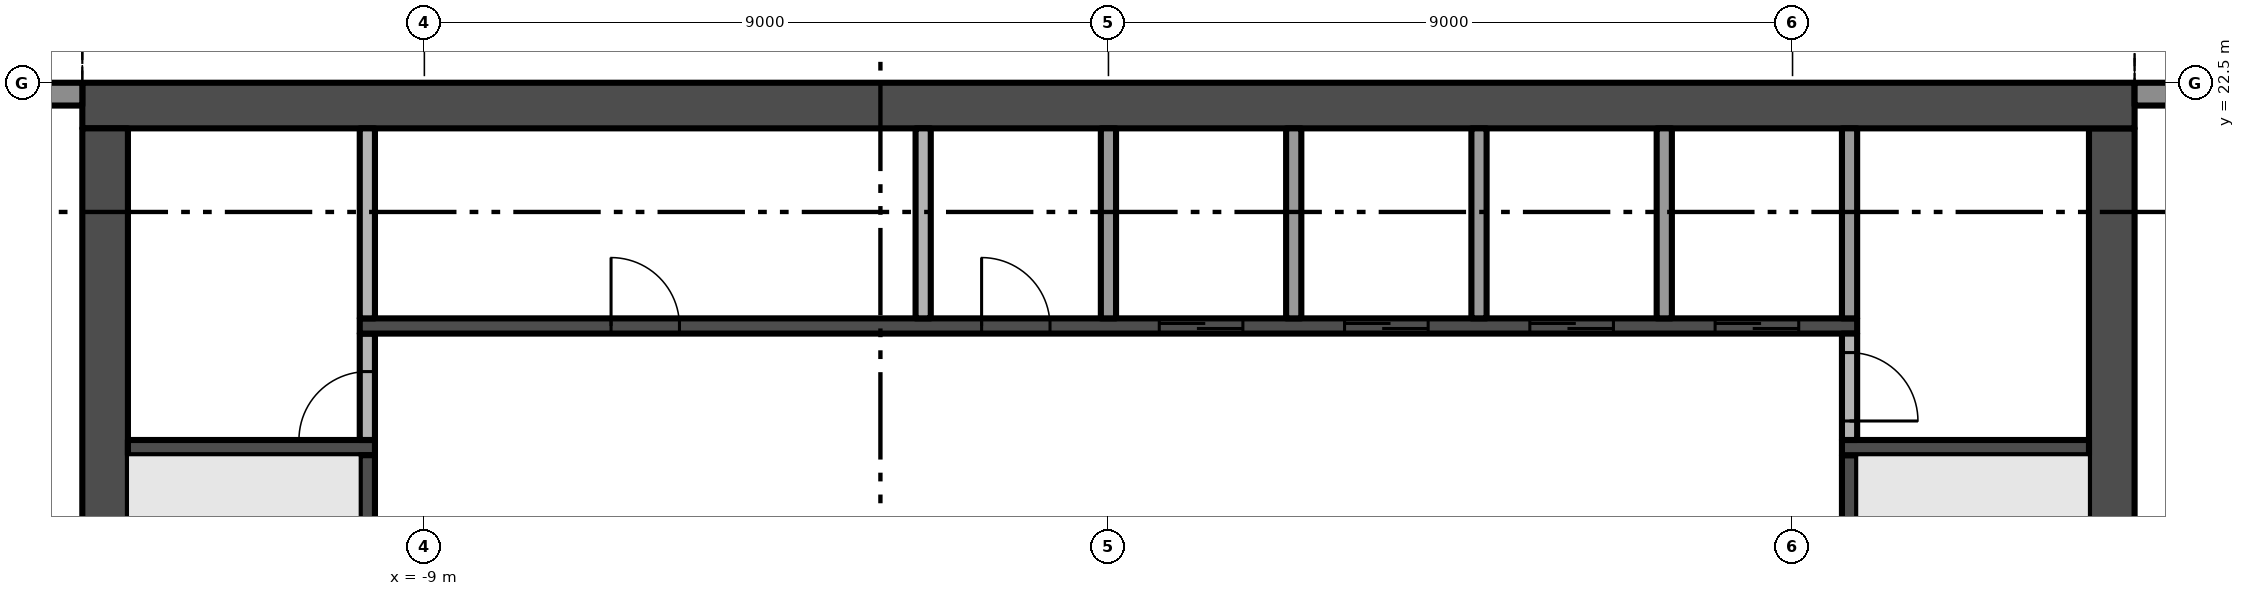
"""IFC4 building model, lengths in metres.
Left out: names, types, materials, properties, quantities, classifications, styles, units other than length and angle.
Written with IfcOpenShell. Run it as: python <this file> out.ifc"""

import sys

from ifc_helpers import new_model, si_unit, direction, frame, frame_2d, origin, place, context, subcontext, project, spatial, rectangle, extrude, element, fill, save


model = new_model("IFC4")
c1 = context("Model", 3, precision=1e-05, world=origin(), true_north=direction((0.0, 1.0)))
c2 = subcontext(c1, "Body", "Model", "MODEL_VIEW")
j1 = project(units=[si_unit("LENGTHUNIT", "METRE"), si_unit("PLANEANGLEUNIT", "RADIAN")], contexts=[c1])
p1 = place(None, origin())
s1 = spatial("IfcSite", under=j1, at=p1, CompositionType="ELEMENT")
p2 = place(p1, origin())
s2 = spatial("IfcBuilding", under=s1, at=p2, CompositionType="ELEMENT")
p3 = place(p2, frame((0.0, 0.0, 238.8)))
s3 = spatial("IfcBuildingStorey", under=s2, at=p3, CompositionType="ELEMENT", Elevation=238.8)
p4 = place(p3, frame((13.2, 5.1, -0.3), z_axis=(0.0, 0.0, 1.0), x_axis=(0.0, 1.0, 0.0)))
e1 = element("IfcWall", 1, at=p4, inside=s3, PredefinedType="SHEAR", context=c2, shape_type="SweptSolid", body=[
    extrude(rectangle(XDim=16.8, YDim=0.6, at=frame_2d((8.4, 0.0))), origin(), (0.0, 0.0, 1.0), 3.8),
])
p5 = place(p4, frame((6.3, 0.0, 0.3)))
e2 = element("IfcOpeningElement", 2, at=p5, cuts=e1, PredefinedType="OPENING", context=c2, shape_type="SweptSolid", body=[
    extrude(rectangle(XDim=1.2, YDim=2.2, at=frame_2d((0.6, 1.1))), frame((0.0, 0.31, 0.0), z_axis=(0.0, -1.0, 0.0), x_axis=(1.0, 0.0, 0.0)), (0.0, 0.0, 1.0), 0.62),
])
p6 = place(p3, frame((13.5, 22.2, -0.3), z_axis=(0.0, 0.0, 1.0), x_axis=(-1.0, 0.0, 0.0)))
e3 = element("IfcWall", 3, at=p6, inside=s3, PredefinedType="SHEAR", context=c2, shape_type="SweptSolid", body=[
    extrude(rectangle(XDim=27.0, YDim=0.6, at=frame_2d((13.5, 0.0))), origin(), (0.0, 0.0, 1.0), 3.8),
])
p7 = place(p3, frame((-13.2, 21.9, -0.3), z_axis=(0.0, 0.0, 1.0), x_axis=(0.0, -1.0, 0.0)))
e4 = element("IfcWall", 4, at=p7, inside=s3, PredefinedType="SHEAR", context=c2, shape_type="SweptSolid", body=[
    extrude(rectangle(XDim=16.8, YDim=0.6, at=frame_2d((8.4, 0.0))), origin(), (0.0, 0.0, 1.0), 3.8),
])
p8 = place(p7, frame((9.3, 0.0, 0.3)))
e5 = element("IfcOpeningElement", 5, at=p8, cuts=e4, PredefinedType="OPENING", context=c2, shape_type="SweptSolid", body=[
    extrude(rectangle(XDim=1.2, YDim=2.2, at=frame_2d((0.6, 1.1))), frame((0.0, 0.31, 0.0), z_axis=(0.0, -1.0, 0.0), x_axis=(1.0, 0.0, 0.0)), (0.0, 0.0, 1.0), 0.62),
])
p9 = place(p3, frame((13.5, 22.35, 0.0), z_axis=(0.0, 0.0, 1.0), x_axis=(1.0, 0.0, 0.0)))
e6 = element("IfcWall", 6, at=p9, inside=s3, PredefinedType="SOLIDWALL", context=c2, shape_type="SweptSolid", body=[
    extrude(rectangle(XDim=4.05, YDim=0.3, at=frame_2d((2.025, 0.0))), origin(), (0.0, 0.0, 1.0), 3.5),
])
p10 = place(p9, frame((0.55, 0.0, 0.0)))
e7 = element("IfcOpeningElement", 7, at=p10, cuts=e6, PredefinedType="OPENING", context=c2, shape_type="SweptSolid", body=[
    extrude(rectangle(XDim=3.2, YDim=2.4, at=frame_2d((1.6, 1.2))), frame((0.0, 0.16, 0.0), z_axis=(0.0, -1.0, 0.0), x_axis=(1.0, 0.0, 0.0)), (0.0, 0.0, 1.0), 0.32),
])
p11 = place(p3, frame((-17.55, 22.35, 0.0), z_axis=(0.0, 0.0, 1.0), x_axis=(1.0, 0.0, 0.0)))
e8 = element("IfcWall", 8, at=p11, inside=s3, PredefinedType="SOLIDWALL", context=c2, shape_type="SweptSolid", body=[
    extrude(rectangle(XDim=4.05, YDim=0.3, at=frame_2d((2.025, 0.0))), origin(), (0.0, 0.0, 1.0), 3.5),
])
p12 = place(p11, frame((0.3, 0.0, 0.45)))
e9 = element("IfcOpeningElement", 9, at=p12, cuts=e8, PredefinedType="OPENING", context=c2, shape_type="SweptSolid", body=[
    extrude(rectangle(XDim=3.2, YDim=2.65, at=frame_2d((1.6, 1.325))), frame((0.0, 0.16, 0.0), z_axis=(0.0, -1.0, 0.0), x_axis=(1.0, 0.0, 0.0)), (0.0, 0.0, 1.0), 0.32),
])
p13 = place(p3, frame((-12.9, 17.7, 0.0), z_axis=(0.0, 0.0, 1.0), x_axis=(1.0, 0.0, 0.0)))
e10 = element("IfcWall", 10, at=p13, inside=s3, PredefinedType="SHEAR", context=c2, shape_type="SweptSolid", body=[
    extrude(rectangle(XDim=3.25, YDim=0.2, at=frame_2d((1.625, 0.0))), origin(), (0.0, 0.0, 1.0), 3.5),
])
p14 = place(p3, frame((-9.75, 16.1, 0.0), z_axis=(0.0, 0.0, 1.0), x_axis=(0.0, 1.0, 0.0)))
e11 = element("IfcWall", 11, at=p14, inside=s3, PredefinedType="SHEAR", context=c2, shape_type="SweptSolid", body=[
    extrude(rectangle(XDim=1.5, YDim=0.2, at=frame_2d((0.75, 0.0))), origin(), (0.0, 0.0, 1.0), 3.5),
])
p15 = place(p3, frame((-9.75, 17.8, 0.0), z_axis=(0.0, 0.0, 1.0), x_axis=(0.0, 1.0, 0.0)))
e12 = element("IfcWall", 12, at=p15, inside=s3, PredefinedType="PARTITIONING", context=c2, shape_type="SweptSolid", body=[
    extrude(rectangle(XDim=1.4, YDim=0.2, at=frame_2d((0.7, 0.0))), origin(), (0.0, 0.0, 1.0), 3.5),
])
p16 = place(p15, origin())
e13 = element("IfcOpeningElement", 13, at=p16, cuts=e12, PredefinedType="OPENING", context=c2, shape_type="SweptSolid", body=[
    extrude(rectangle(XDim=0.9, YDim=2.1, at=frame_2d((0.45, 1.05))), frame((0.0, 0.11, 0.0), z_axis=(0.0, -1.0, 0.0), x_axis=(1.0, 0.0, 0.0)), (0.0, 0.0, 1.0), 0.22),
])
p17 = place(p3, frame((-9.85, 19.3, 0.0), z_axis=(0.0, 0.0, 1.0), x_axis=(1.0, 0.0, 0.0)))
e14 = element("IfcWall", 14, at=p17, inside=s3, PredefinedType="SHEAR", context=c2, shape_type="SweptSolid", body=[
    extrude(rectangle(XDim=19.7, YDim=0.2, at=frame_2d((9.85, 0.0))), origin(), (0.0, 0.0, 1.0), 3.5),
])
p18 = place(p17, frame((10.519, 0.0, 0.0)))
e15 = element("IfcOpeningElement", 15, at=p18, cuts=e14, PredefinedType="OPENING", context=c2, shape_type="SweptSolid", body=[
    extrude(rectangle(XDim=1.1, YDim=2.1, at=frame_2d((0.55, 1.05))), frame((0.0, 0.11, 0.0), z_axis=(0.0, -1.0, 0.0), x_axis=(1.0, 0.0, 0.0)), (0.0, 0.0, 1.0), 0.22),
])
p19 = place(p17, frame((12.956, 0.0, 0.0)))
e16 = element("IfcOpeningElement", 16, at=p19, cuts=e14, PredefinedType="OPENING", context=c2, shape_type="SweptSolid", body=[
    extrude(rectangle(XDim=1.1, YDim=2.1, at=frame_2d((0.55, 1.05))), frame((0.0, 0.11, 0.0), z_axis=(0.0, -1.0, 0.0), x_axis=(1.0, 0.0, 0.0)), (0.0, 0.0, 1.0), 0.22),
])
p20 = place(p17, frame((15.394, 0.0, 0.0)))
e17 = element("IfcOpeningElement", 17, at=p20, cuts=e14, PredefinedType="OPENING", context=c2, shape_type="SweptSolid", body=[
    extrude(rectangle(XDim=1.1, YDim=2.1, at=frame_2d((0.55, 1.05))), frame((0.0, 0.11, 0.0), z_axis=(0.0, -1.0, 0.0), x_axis=(1.0, 0.0, 0.0)), (0.0, 0.0, 1.0), 0.22),
])
p21 = place(p17, frame((17.831, 0.0, 0.0)))
e18 = element("IfcOpeningElement", 18, at=p21, cuts=e14, PredefinedType="OPENING", context=c2, shape_type="SweptSolid", body=[
    extrude(rectangle(XDim=1.1, YDim=2.1, at=frame_2d((0.55, 1.05))), frame((0.0, 0.11, 0.0), z_axis=(0.0, -1.0, 0.0), x_axis=(1.0, 0.0, 0.0)), (0.0, 0.0, 1.0), 0.22),
])
p22 = place(p17, frame((3.306, 0.0, 0.0)))
e19 = element("IfcOpeningElement", 19, at=p22, cuts=e14, PredefinedType="OPENING", context=c2, shape_type="SweptSolid", body=[
    extrude(rectangle(XDim=0.9, YDim=2.1, at=frame_2d((0.45, 1.05))), frame((0.0, 0.11, 0.0), z_axis=(0.0, -1.0, 0.0), x_axis=(1.0, 0.0, 0.0)), (0.0, 0.0, 1.0), 0.22),
])
p23 = place(p17, frame((8.181, 0.0, 0.0)))
e20 = element("IfcOpeningElement", 20, at=p23, cuts=e14, PredefinedType="OPENING", context=c2, shape_type="SweptSolid", body=[
    extrude(rectangle(XDim=0.9, YDim=2.1, at=frame_2d((0.45, 1.05))), frame((0.0, 0.11, 0.0), z_axis=(0.0, -1.0, 0.0), x_axis=(1.0, 0.0, 0.0)), (0.0, 0.0, 1.0), 0.22),
])
for number, where, z_axis, x_axis in (
    (21, (-9.75, 19.4, 0.0), (0.0, 0.0, 1.0), (0.0, 1.0, 0.0)),
    (22, (-2.438, 19.4, 0.0), (0.0, 0.0, 1.0), (0.0, 1.0, 0.0)),
    (23, (0.0, 19.4, 0.0), (0.0, 0.0, 1.0), (0.0, 1.0, 0.0)),
    (24, (2.438, 19.4, 0.0), (0.0, 0.0, 1.0), (0.0, 1.0, 0.0)),
    (25, (4.875, 19.4, 0.0), (0.0, 0.0, 1.0), (0.0, 1.0, 0.0)),
    (26, (7.312, 19.4, 0.0), (0.0, 0.0, 1.0), (0.0, 1.0, 0.0)),
):
    element("IfcWall", number, at=place(p3, frame(where, z_axis=z_axis, x_axis=x_axis)), inside=s3, PredefinedType="PARTITIONING", context=c2, shape_type="SweptSolid", body=[
        extrude(rectangle(XDim=2.5, YDim=0.2, at=frame_2d((1.25, 0.0))), origin(), (0.0, 0.0, 1.0), 3.5),
    ])
p24 = place(p3, frame((9.75, 16.1, 0.0), z_axis=(0.0, 0.0, 1.0), x_axis=(0.0, 1.0, 0.0)))
e27 = element("IfcWall", 27, at=p24, inside=s3, PredefinedType="SHEAR", context=c2, shape_type="SweptSolid", body=[
    extrude(rectangle(XDim=1.5, YDim=0.2, at=frame_2d((0.75, 0.0))), origin(), (0.0, 0.0, 1.0), 3.5),
])
p25 = place(p3, frame((9.65, 17.7, 0.0), z_axis=(0.0, 0.0, 1.0), x_axis=(1.0, 0.0, 0.0)))
e28 = element("IfcWall", 28, at=p25, inside=s3, PredefinedType="SHEAR", context=c2, shape_type="SweptSolid", body=[
    extrude(rectangle(XDim=3.25, YDim=0.2, at=frame_2d((1.625, 0.0))), origin(), (0.0, 0.0, 1.0), 3.5),
])
p26 = place(p3, frame((9.75, 19.2, 0.0), z_axis=(0.0, 0.0, 1.0), x_axis=(0.0, -1.0, 0.0)))
e29 = element("IfcWall", 29, at=p26, inside=s3, PredefinedType="PARTITIONING", context=c2, shape_type="SweptSolid", body=[
    extrude(rectangle(XDim=1.4, YDim=0.2, at=frame_2d((0.7, 0.0))), origin(), (0.0, 0.0, 1.0), 3.5),
])
p27 = place(p26, frame((0.25, 0.0, 0.0)))
e30 = element("IfcOpeningElement", 30, at=p27, cuts=e29, PredefinedType="OPENING", context=c2, shape_type="SweptSolid", body=[
    extrude(rectangle(XDim=0.9, YDim=2.1, at=frame_2d((0.45, 1.05))), frame((0.0, 0.11, 0.0), z_axis=(0.0, -1.0, 0.0), x_axis=(1.0, 0.0, 0.0)), (0.0, 0.0, 1.0), 0.22),
])
p28 = place(p3, frame((9.75, 19.4, 0.0), z_axis=(0.0, 0.0, 1.0), x_axis=(0.0, 1.0, 0.0)))
e31 = element("IfcWall", 31, at=p28, inside=s3, PredefinedType="PARTITIONING", context=c2, shape_type="SweptSolid", body=[
    extrude(rectangle(XDim=2.5, YDim=0.2, at=frame_2d((1.25, 0.0))), origin(), (0.0, 0.0, 1.0), 3.5),
])
p29 = place(p18, origin())
e32 = element("IfcDoor", 32, at=p29, inside=s3, OperationType="SLIDING_TO_RIGHT", PredefinedType="DOOR", context=c2, shape_type="SweptSolid", body=[
    extrude(rectangle(XDim=1.1, YDim=2.1, at=frame_2d((0.55, 1.05))), frame((0.0, 0.025, 0.0), z_axis=(0.0, -1.0, 0.0), x_axis=(1.0, 0.0, 0.0)), (0.0, 0.0, 1.0), 0.05),
])
fill(e15, e32)
p30 = place(p19, origin())
e33 = element("IfcDoor", 33, at=p30, inside=s3, OperationType="SLIDING_TO_RIGHT", PredefinedType="DOOR", context=c2, shape_type="SweptSolid", body=[
    extrude(rectangle(XDim=1.1, YDim=2.1, at=frame_2d((0.55, 1.05))), frame((0.0, 0.025, 0.0), z_axis=(0.0, -1.0, 0.0), x_axis=(1.0, 0.0, 0.0)), (0.0, 0.0, 1.0), 0.05),
])
fill(e16, e33)
p31 = place(p20, origin())
e34 = element("IfcDoor", 34, at=p31, inside=s3, OperationType="SLIDING_TO_RIGHT", PredefinedType="DOOR", context=c2, shape_type="SweptSolid", body=[
    extrude(rectangle(XDim=1.1, YDim=2.1, at=frame_2d((0.55, 1.05))), frame((0.0, 0.025, 0.0), z_axis=(0.0, -1.0, 0.0), x_axis=(1.0, 0.0, 0.0)), (0.0, 0.0, 1.0), 0.05),
])
fill(e17, e34)
p32 = place(p21, origin())
e35 = element("IfcDoor", 35, at=p32, inside=s3, OperationType="SLIDING_TO_RIGHT", PredefinedType="DOOR", context=c2, shape_type="SweptSolid", body=[
    extrude(rectangle(XDim=1.1, YDim=2.1, at=frame_2d((0.55, 1.05))), frame((0.0, 0.025, 0.0), z_axis=(0.0, -1.0, 0.0), x_axis=(1.0, 0.0, 0.0)), (0.0, 0.0, 1.0), 0.05),
])
fill(e18, e35)
p33 = place(p16, origin())
e36 = element("IfcDoor", 36, at=p33, inside=s3, OperationType="SINGLE_SWING_LEFT", PredefinedType="DOOR", context=c2, shape_type="SweptSolid", body=[
    extrude(rectangle(XDim=0.9, YDim=2.1, at=frame_2d((0.45, 1.05))), frame((0.0, 0.025, 0.0), z_axis=(0.0, -1.0, 0.0), x_axis=(1.0, 0.0, 0.0)), (0.0, 0.0, 1.0), 0.05),
])
fill(e13, e36)
p34 = place(p27, origin())
e37 = element("IfcDoor", 37, at=p34, inside=s3, OperationType="SINGLE_SWING_RIGHT", PredefinedType="DOOR", context=c2, shape_type="SweptSolid", body=[
    extrude(rectangle(XDim=0.9, YDim=2.1, at=frame_2d((0.45, 1.05))), frame((0.0, 0.025, 0.0), z_axis=(0.0, -1.0, 0.0), x_axis=(1.0, 0.0, 0.0)), (0.0, 0.0, 1.0), 0.05),
])
fill(e30, e37)
p35 = place(p22, origin())
e38 = element("IfcDoor", 38, at=p35, inside=s3, OperationType="SINGLE_SWING_LEFT", PredefinedType="DOOR", context=c2, shape_type="SweptSolid", body=[
    extrude(rectangle(XDim=0.9, YDim=2.1, at=frame_2d((0.45, 1.05))), frame((0.0, 0.025, 0.0), z_axis=(0.0, -1.0, 0.0), x_axis=(1.0, 0.0, 0.0)), (0.0, 0.0, 1.0), 0.05),
])
fill(e19, e38)
p36 = place(p23, origin())
e39 = element("IfcDoor", 39, at=p36, inside=s3, OperationType="SINGLE_SWING_LEFT", PredefinedType="DOOR", context=c2, shape_type="SweptSolid", body=[
    extrude(rectangle(XDim=0.9, YDim=2.1, at=frame_2d((0.45, 1.05))), frame((0.0, 0.025, 0.0), z_axis=(0.0, -1.0, 0.0), x_axis=(1.0, 0.0, 0.0)), (0.0, 0.0, 1.0), 0.05),
])
fill(e20, e39)
save(model, sys.argv[1])
